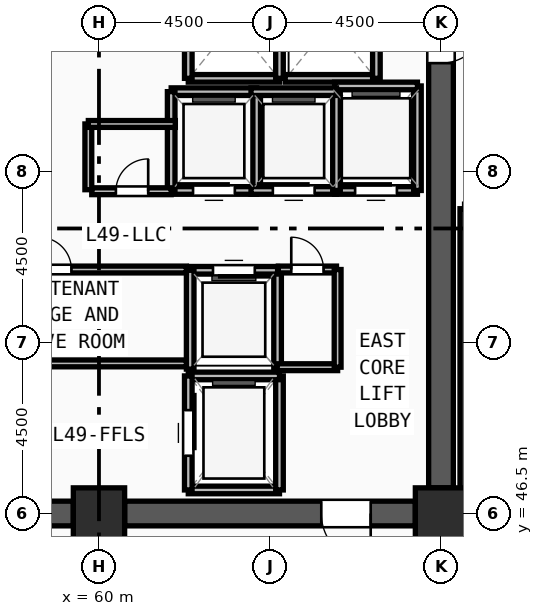
"""IFC4 building model, lengths in metres.
Left out: names, types, materials, properties, quantities, classifications, styles, units other than length and angle.
Written with IfcOpenShell. Run it as: python <this file> out.ifc"""

import sys

from ifc_helpers import new_model, si_unit, direction, frame, frame_2d, origin, origin_2d, place, context, subcontext, project, spatial, rectangle, extrude, source, transform, mapped, element, fill, save


model = new_model("IFC4")
c1 = context("Model", 3, precision=1e-05, world=origin(), true_north=direction((0.0, 1.0)))
c2 = subcontext(c1, "Body", "Model", "MODEL_VIEW")
j1 = project(units=[si_unit("LENGTHUNIT", "METRE"), si_unit("PLANEANGLEUNIT", "RADIAN")], contexts=[c1])
p1 = place(None, origin())
s1 = spatial("IfcSite", under=j1, at=p1, CompositionType="ELEMENT")
p2 = place(p1, origin())
s2 = spatial("IfcBuilding", under=s1, at=p2, CompositionType="ELEMENT")
p3 = place(p2, frame((0.0, 0.0, 189.75)))
s3 = spatial("IfcBuildingStorey", under=s2, at=p3, CompositionType="ELEMENT", Elevation=189.75)
m1 = source(origin(), c2, "Body", "SweptSolid", [
    extrude(rectangle(XDim=1.35, YDim=1.35, at=origin_2d()), origin(), (0.0, 0.0, 1.0), 4.5),
])
for number, where, z_axis, x_axis in (
    (1, (60.0, 46.5, 0.0), (0.0, 0.0, 1.0), (1.0, 0.0, 0.0)),
    (2, (69.0, 46.5, 0.0), (0.0, 0.0, 1.0), (1.0, 0.0, 0.0)),
):
    element("IfcColumn", number, at=place(p3, frame(where, z_axis=z_axis, x_axis=x_axis)), inside=s3, PredefinedType="COLUMN", context=c2, shape_type="MappedRepresentation", body=[
        mapped(m1, transform((0.0, 0.0, 0.0), x_axis=(1.0, 0.0, 0.0), y_axis=(0.0, 1.0, 0.0), z_axis=(0.0, 0.0, 1.0), scale=1.0)),
    ])
p4 = place(p3, frame((69.0, 60.825, 0.0), z_axis=(0.0, 0.0, 1.0), x_axis=(0.0, -1.0, 0.0)))
e3 = element("IfcWall", 3, at=p4, inside=s3, PredefinedType="SHEAR", context=c2, shape_type="SweptSolid", body=[
    extrude(rectangle(XDim=13.65, YDim=0.65, at=frame_2d((6.825, 0.0))), origin(), (0.0, 0.0, 1.0), 4.32),
])
m2 = source(origin(), c2, "Body", "SweptSolid", [
    extrude(rectangle(XDim=1.2, YDim=2.2, at=frame_2d((0.6, 1.1))), frame((0.0, 0.335, 0.0), z_axis=(0.0, -1.0, 0.0), x_axis=(1.0, 0.0, 0.0)), (0.0, 0.0, 1.0), 0.67),
])
p5 = place(p4, frame((1.275, 0.0, 0.0)))
e4 = element("IfcOpeningElement", 4, at=p5, cuts=e3, PredefinedType="OPENING", context=c2, shape_type="MappedRepresentation", body=[
    mapped(m2, transform((0.0, 0.0, 0.0), x_axis=(1.0, 0.0, 0.0), y_axis=(0.0, 1.0, 0.0), z_axis=(0.0, 0.0, 1.0), scale=1.0)),
])
p6 = place(p3, frame((68.325, 46.5, 0.0), z_axis=(0.0, 0.0, 1.0), x_axis=(-1.0, 0.0, 0.0)))
e5 = element("IfcWall", 5, at=p6, inside=s3, PredefinedType="SHEAR", context=c2, shape_type="SweptSolid", body=[
    extrude(rectangle(XDim=7.65, YDim=0.65, at=frame_2d((3.825, 0.0))), origin(), (0.0, 0.0, 1.0), 4.32),
])
m3 = source(origin(), c2, "Body", "SweptSolid", [
    extrude(rectangle(XDim=1.3, YDim=2.2, at=frame_2d((0.65, 1.1))), frame((0.0, 0.335, 0.0), z_axis=(0.0, -1.0, 0.0), x_axis=(1.0, 0.0, 0.0)), (0.0, 0.0, 1.0), 0.67),
])
p7 = place(p6, frame((1.175, 0.0, 0.0)))
e6 = element("IfcOpeningElement", 6, at=p7, cuts=e5, PredefinedType="OPENING", context=c2, shape_type="MappedRepresentation", body=[
    mapped(m3, transform((0.0, 0.0, 0.0), x_axis=(1.0, 0.0, 0.0), y_axis=(0.0, 1.0, 0.0), z_axis=(0.0, 0.0, 1.0), scale=1.0)),
])
p8 = place(p3, frame((59.325, 46.5, 0.0), z_axis=(0.0, 0.0, 1.0), x_axis=(-1.0, 0.0, 0.0)))
e7 = element("IfcWall", 7, at=p8, inside=s3, PredefinedType="SHEAR", context=c2, shape_type="SweptSolid", body=[
    extrude(rectangle(XDim=7.65, YDim=0.65, at=frame_2d((3.825, 0.0))), origin(), (0.0, 0.0, 1.0), 4.32),
])
p9 = place(p8, frame((5.175, 0.0, 0.0)))
e8 = element("IfcOpeningElement", 8, at=p9, cuts=e7, PredefinedType="OPENING", context=c2, shape_type="MappedRepresentation", body=[
    mapped(m3, transform((0.0, 0.0, 0.0), x_axis=(1.0, 0.0, 0.0), y_axis=(0.0, 1.0, 0.0), z_axis=(0.0, 0.0, 1.0), scale=1.0)),
])
m4 = source(origin(), c2, "Body", "SweptSolid", [
    extrude(rectangle(XDim=1.0, YDim=2.2, at=frame_2d((0.5, 1.1))), frame((0.0, 0.335, 0.0), z_axis=(0.0, -1.0, 0.0), x_axis=(1.0, 0.0, 0.0)), (0.0, 0.0, 1.0), 0.67),
])
p10 = place(p8, frame((0.675, 0.0, 0.0)))
e9 = element("IfcOpeningElement", 9, at=p10, cuts=e7, PredefinedType="OPENING", context=c2, shape_type="MappedRepresentation", body=[
    mapped(m4, transform((0.0, 0.0, 0.0), x_axis=(1.0, 0.0, 0.0), y_axis=(0.0, 1.0, 0.0), z_axis=(0.0, 0.0, 1.0), scale=1.0)),
])
p11 = place(p3, frame((69.62, 54.52, 0.0), z_axis=(0.0, 0.0, 1.0), x_axis=(0.0, -1.0, 0.0)))
e10 = element("IfcWall", 10, at=p11, inside=s3, PredefinedType="SOLIDWALL", context=c2, shape_type="SweptSolid", body=[
    extrude(rectangle(XDim=7.82, YDim=0.24, at=frame_2d((3.91, 0.0))), origin(), (0.0, 0.0, 1.0), 4.32),
])
p12 = place(p3, frame((62.35, 47.12, 0.0), z_axis=(0.0, 0.0, 1.0), x_axis=(1.0, 0.0, 0.0)))
e11 = element("IfcWall", 11, at=p12, inside=s3, PredefinedType="SOLIDWALL", context=c2, shape_type="SweptSolid", body=[
    extrude(rectangle(XDim=2.4, YDim=0.2, at=frame_2d((1.2, 0.0))), origin(), (0.0, 0.0, 1.0), 4.32),
])
p13 = place(p3, frame((64.75, 47.12, 0.0), z_axis=(0.0, 0.0, 1.0), x_axis=(0.0, 1.0, 0.0)))
e12 = element("IfcWall", 12, at=p13, inside=s3, PredefinedType="SOLIDWALL", context=c2, shape_type="SweptSolid", body=[
    extrude(rectangle(XDim=3.0, YDim=0.2, at=frame_2d((1.5, 0.0))), origin(), (0.0, 0.0, 1.0), 4.32),
])
p14 = place(p3, frame((64.75, 50.12, 0.0), z_axis=(0.0, 0.0, 1.0), x_axis=(-1.0, 0.0, 0.0)))
e13 = element("IfcWall", 13, at=p14, inside=s3, PredefinedType="SOLIDWALL", context=c2, shape_type="SweptSolid", body=[
    extrude(rectangle(XDim=2.4, YDim=0.2, at=frame_2d((1.2, 0.0))), origin(), (0.0, 0.0, 1.0), 4.32),
])
p15 = place(p3, frame((62.35, 50.12, 0.0), z_axis=(0.0, 0.0, 1.0), x_axis=(0.0, -1.0, 0.0)))
e14 = element("IfcWall", 14, at=p15, inside=s3, PredefinedType="SOLIDWALL", context=c2, shape_type="SweptSolid", body=[
    extrude(rectangle(XDim=3.0, YDim=0.2, at=frame_2d((1.5, 0.0))), origin(), (0.0, 0.0, 1.0), 4.32),
])
m5 = source(origin(), c2, "Body", "SweptSolid", [
    extrude(rectangle(XDim=1.2, YDim=2.3, at=frame_2d((0.6, 1.15))), frame((0.0, 0.11, 0.0), z_axis=(0.0, -1.0, 0.0), x_axis=(1.0, 0.0, 0.0)), (0.0, 0.0, 1.0), 0.22),
])
p16 = place(p15, frame((0.9, 0.0, 0.0)))
e15 = element("IfcOpeningElement", 15, at=p16, cuts=e14, PredefinedType="OPENING", context=c2, shape_type="MappedRepresentation", body=[
    mapped(m5, transform((0.0, 0.0, 0.0), x_axis=(1.0, 0.0, 0.0), y_axis=(0.0, 1.0, 0.0), z_axis=(0.0, 0.0, 1.0), scale=1.0)),
])
p17 = place(p3, frame((62.35, 57.95, 0.0), z_axis=(0.0, 0.0, 1.0), x_axis=(1.0, 0.0, 0.0)))
e16 = element("IfcWall", 16, at=p17, inside=s3, PredefinedType="SOLIDWALL", context=c2, shape_type="SweptSolid", body=[
    extrude(rectangle(XDim=2.4, YDim=0.2, at=frame_2d((1.2, 0.0))), origin(), (0.0, 0.0, 1.0), 4.32),
])
for number, where, z_axis, x_axis in (
    (17, (64.75, 57.95, 0.0), (0.0, 0.0, 1.0), (0.0, 1.0, 0.0)),
    (18, (62.35, 60.88, 0.0), (0.0, 0.0, 1.0), (0.0, -1.0, 0.0)),
):
    element("IfcWall", number, at=place(p3, frame(where, z_axis=z_axis, x_axis=x_axis)), inside=s3, PredefinedType="SOLIDWALL", context=c2, shape_type="SweptSolid", body=[
        extrude(rectangle(XDim=2.93, YDim=0.2, at=frame_2d((1.465, 0.0))), origin(), (0.0, 0.0, 1.0), 4.32),
    ])
p18 = place(p3, frame((64.9, 57.95, 0.0), z_axis=(0.0, 0.0, 1.0), x_axis=(1.0, 0.0, 0.0)))
e19 = element("IfcWall", 19, at=p18, inside=s3, PredefinedType="SOLIDWALL", context=c2, shape_type="SweptSolid", body=[
    extrude(rectangle(XDim=2.4, YDim=0.2, at=frame_2d((1.2, 0.0))), origin(), (0.0, 0.0, 1.0), 4.32),
])
p19 = place(p3, frame((67.3, 57.95, 0.0), z_axis=(0.0, 0.0, 1.0), x_axis=(0.0, 1.0, 0.0)))
e20 = element("IfcWall", 20, at=p19, inside=s3, PredefinedType="SOLIDWALL", context=c2, shape_type="SweptSolid", body=[
    extrude(rectangle(XDim=2.93, YDim=0.2, at=frame_2d((1.465, 0.0))), origin(), (0.0, 0.0, 1.0), 4.32),
])
p20 = place(p3, frame((66.2, 55.0, 0.0), z_axis=(0.0, 0.0, 1.0), x_axis=(1.0, 0.0, 0.0)))
e21 = element("IfcWall", 21, at=p20, inside=s3, PredefinedType="SOLIDWALL", context=c2, shape_type="SweptSolid", body=[
    extrude(rectangle(XDim=2.18, YDim=0.2, at=frame_2d((1.09, 0.0))), origin(), (0.0, 0.0, 1.0), 4.32),
])
m6 = source(origin(), c2, "Body", "SweptSolid", [
    extrude(rectangle(XDim=1.1, YDim=2.2, at=frame_2d((0.55, 1.1))), frame((0.0, 0.11, 0.0), z_axis=(0.0, -1.0, 0.0), x_axis=(1.0, 0.0, 0.0)), (0.0, 0.0, 1.0), 0.22),
])
p21 = place(p20, frame((0.54, 0.0, 0.0)))
e22 = element("IfcOpeningElement", 22, at=p21, cuts=e21, PredefinedType="OPENING", context=c2, shape_type="MappedRepresentation", body=[
    mapped(m6, transform((0.0, 0.0, 0.0), x_axis=(1.0, 0.0, 0.0), y_axis=(0.0, 1.0, 0.0), z_axis=(0.0, 0.0, 1.0), scale=1.0)),
])
p22 = place(p3, frame((68.38, 55.0, 0.0), z_axis=(0.0, 0.0, 1.0), x_axis=(0.0, 1.0, 0.0)))
e23 = element("IfcWall", 23, at=p22, inside=s3, PredefinedType="SOLIDWALL", context=c2, shape_type="SweptSolid", body=[
    extrude(rectangle(XDim=2.75, YDim=0.2, at=frame_2d((1.375, 0.0))), origin(), (0.0, 0.0, 1.0), 4.32),
])
p23 = place(p3, frame((68.38, 57.75, 0.0), z_axis=(0.0, 0.0, 1.0), x_axis=(-1.0, 0.0, 0.0)))
e24 = element("IfcWall", 24, at=p23, inside=s3, PredefinedType="SOLIDWALL", context=c2, shape_type="SweptSolid", body=[
    extrude(rectangle(XDim=2.18, YDim=0.2, at=frame_2d((1.09, 0.0))), origin(), (0.0, 0.0, 1.0), 4.32),
])
p24 = place(p3, frame((64.7, 50.3, 0.0), z_axis=(0.0, 0.0, 1.0), x_axis=(0.0, 1.0, 0.0)))
e25 = element("IfcWall", 25, at=p24, inside=s3, PredefinedType="SOLIDWALL", context=c2, shape_type="SweptSolid", body=[
    extrude(rectangle(XDim=2.6, YDim=0.2, at=frame_2d((1.3, 0.0))), origin(), (0.0, 0.0, 1.0), 4.32),
])
p25 = place(p3, frame((64.7, 52.9, 0.0), z_axis=(0.0, 0.0, 1.0), x_axis=(-1.0, 0.0, 0.0)))
e26 = element("IfcWall", 26, at=p25, inside=s3, PredefinedType="SOLIDWALL", context=c2, shape_type="SweptSolid", body=[
    extrude(rectangle(XDim=2.3, YDim=0.2, at=frame_2d((1.15, 0.0))), origin(), (0.0, 0.0, 1.0), 4.32),
])
p26 = place(p25, frame((0.6, 0.0, 0.0)))
e27 = element("IfcOpeningElement", 27, at=p26, cuts=e26, PredefinedType="OPENING", context=c2, shape_type="MappedRepresentation", body=[
    mapped(m6, transform((0.0, 0.0, 0.0), x_axis=(1.0, 0.0, 0.0), y_axis=(0.0, 1.0, 0.0), z_axis=(0.0, 0.0, 1.0), scale=1.0)),
])
p27 = place(p3, frame((62.4, 52.9, 0.0), z_axis=(0.0, 0.0, 1.0), x_axis=(0.0, -1.0, 0.0)))
e28 = element("IfcWall", 28, at=p27, inside=s3, PredefinedType="SOLIDWALL", context=c2, shape_type="SweptSolid", body=[
    extrude(rectangle(XDim=2.6, YDim=0.2, at=frame_2d((1.3, 0.0))), origin(), (0.0, 0.0, 1.0), 4.32),
])
p28 = place(p3, frame((61.9, 55.0, 0.0), z_axis=(0.0, 0.0, 1.0), x_axis=(1.0, 0.0, 0.0)))
e29 = element("IfcWall", 29, at=p28, inside=s3, PredefinedType="SOLIDWALL", context=c2, shape_type="SweptSolid", body=[
    extrude(rectangle(XDim=2.25, YDim=0.2, at=frame_2d((1.125, 0.0))), origin(), (0.0, 0.0, 1.0), 4.32),
])
p29 = place(p28, frame((0.575, 0.0, 0.0)))
e30 = element("IfcOpeningElement", 30, at=p29, cuts=e29, PredefinedType="OPENING", context=c2, shape_type="MappedRepresentation", body=[
    mapped(m6, transform((0.0, 0.0, 0.0), x_axis=(1.0, 0.0, 0.0), y_axis=(0.0, 1.0, 0.0), z_axis=(0.0, 0.0, 1.0), scale=1.0)),
])
p30 = place(p3, frame((64.15, 55.0, 0.0), z_axis=(0.0, 0.0, 1.0), x_axis=(0.0, 1.0, 0.0)))
e31 = element("IfcWall", 31, at=p30, inside=s3, PredefinedType="SOLIDWALL", context=c2, shape_type="SweptSolid", body=[
    extrude(rectangle(XDim=2.6, YDim=0.2, at=frame_2d((1.3, 0.0))), origin(), (0.0, 0.0, 1.0), 4.32),
])
p31 = place(p3, frame((64.15, 57.6, 0.0), z_axis=(0.0, 0.0, 1.0), x_axis=(-1.0, 0.0, 0.0)))
e32 = element("IfcWall", 32, at=p31, inside=s3, PredefinedType="SOLIDWALL", context=c2, shape_type="SweptSolid", body=[
    extrude(rectangle(XDim=2.25, YDim=0.2, at=frame_2d((1.125, 0.0))), origin(), (0.0, 0.0, 1.0), 4.32),
])
p32 = place(p3, frame((61.9, 57.6, 0.0), z_axis=(0.0, 0.0, 1.0), x_axis=(0.0, -1.0, 0.0)))
e33 = element("IfcWall", 33, at=p32, inside=s3, PredefinedType="SOLIDWALL", context=c2, shape_type="SweptSolid", body=[
    extrude(rectangle(XDim=2.6, YDim=0.2, at=frame_2d((1.3, 0.0))), origin(), (0.0, 0.0, 1.0), 4.32),
])
p33 = place(p3, frame((64.0, 55.0, 0.0), z_axis=(0.0, 0.0, 1.0), x_axis=(1.0, 0.0, 0.0)))
e34 = element("IfcWall", 34, at=p33, inside=s3, PredefinedType="SOLIDWALL", context=c2, shape_type="SweptSolid", body=[
    extrude(rectangle(XDim=2.25, YDim=0.2, at=frame_2d((1.125, 0.0))), origin(), (0.0, 0.0, 1.0), 4.32),
])
p34 = place(p33, frame((0.575, 0.0, 0.0)))
e35 = element("IfcOpeningElement", 35, at=p34, cuts=e34, PredefinedType="OPENING", context=c2, shape_type="MappedRepresentation", body=[
    mapped(m6, transform((0.0, 0.0, 0.0), x_axis=(1.0, 0.0, 0.0), y_axis=(0.0, 1.0, 0.0), z_axis=(0.0, 0.0, 1.0), scale=1.0)),
])
p35 = place(p3, frame((66.25, 55.0, 0.0), z_axis=(0.0, 0.0, 1.0), x_axis=(0.0, 1.0, 0.0)))
e36 = element("IfcWall", 36, at=p35, inside=s3, PredefinedType="SOLIDWALL", context=c2, shape_type="SweptSolid", body=[
    extrude(rectangle(XDim=2.6, YDim=0.2, at=frame_2d((1.3, 0.0))), origin(), (0.0, 0.0, 1.0), 4.32),
])
p36 = place(p3, frame((66.25, 57.6, 0.0), z_axis=(0.0, 0.0, 1.0), x_axis=(-1.0, 0.0, 0.0)))
e37 = element("IfcWall", 37, at=p36, inside=s3, PredefinedType="SOLIDWALL", context=c2, shape_type="SweptSolid", body=[
    extrude(rectangle(XDim=2.25, YDim=0.2, at=frame_2d((1.125, 0.0))), origin(), (0.0, 0.0, 1.0), 4.32),
])
p37 = place(p3, frame((55.39, 52.92, 0.0), z_axis=(0.0, 0.0, 1.0), x_axis=(1.0, 0.0, 0.0)))
e38 = element("IfcWall", 38, at=p37, inside=s3, PredefinedType="PARTITIONING", context=c2, shape_type="SweptSolid", body=[
    extrude(rectangle(XDim=6.91, YDim=0.18, at=frame_2d((3.455, 0.0))), origin(), (0.0, 0.0, 1.0), 4.32),
])
m7 = source(origin(), c2, "Body", "SweptSolid", [
    extrude(rectangle(XDim=0.85, YDim=2.1, at=frame_2d((0.425, 1.05))), frame((0.0, 0.1, 0.0), z_axis=(0.0, -1.0, 0.0), x_axis=(1.0, 0.0, 0.0)), (0.0, 0.0, 1.0), 0.2),
])
p38 = place(p37, frame((3.035, 0.0, 0.0)))
e39 = element("IfcOpeningElement", 39, at=p38, cuts=e38, PredefinedType="OPENING", context=c2, shape_type="MappedRepresentation", body=[
    mapped(m7, transform((0.0, 0.0, 0.0), x_axis=(1.0, 0.0, 0.0), y_axis=(0.0, 1.0, 0.0), z_axis=(0.0, 0.0, 1.0), scale=1.0)),
])
p39 = place(p3, frame((59.81, 54.98, 0.0), z_axis=(0.0, 0.0, 1.0), x_axis=(1.0, 0.0, 0.0)))
e40 = element("IfcWall", 40, at=p39, inside=s3, PredefinedType="PARTITIONING", context=c2, shape_type="SweptSolid", body=[
    extrude(rectangle(XDim=2.09, YDim=0.18, at=frame_2d((1.045, 0.0))), origin(), (0.0, 0.0, 1.0), 4.32),
])
p40 = place(p39, frame((0.635, 0.0, 0.0)))
e41 = element("IfcOpeningElement", 41, at=p40, cuts=e40, PredefinedType="OPENING", context=c2, shape_type="MappedRepresentation", body=[
    mapped(m7, transform((0.0, 0.0, 0.0), x_axis=(1.0, 0.0, 0.0), y_axis=(0.0, 1.0, 0.0), z_axis=(0.0, 0.0, 1.0), scale=1.0)),
])
p41 = place(p3, frame((64.72, 52.92, 0.0), z_axis=(0.0, 0.0, 1.0), x_axis=(1.0, 0.0, 0.0)))
e42 = element("IfcWall", 42, at=p41, inside=s3, PredefinedType="PARTITIONING", context=c2, shape_type="SweptSolid", body=[
    extrude(rectangle(XDim=1.53, YDim=0.18, at=frame_2d((0.765, 0.0))), origin(), (0.0, 0.0, 1.0), 4.32),
])
p42 = place(p41, frame((0.34, 0.0, 0.0)))
e43 = element("IfcOpeningElement", 43, at=p42, cuts=e42, PredefinedType="OPENING", context=c2, shape_type="MappedRepresentation", body=[
    mapped(m7, transform((0.0, 0.0, 0.0), x_axis=(1.0, 0.0, 0.0), y_axis=(0.0, 1.0, 0.0), z_axis=(0.0, 0.0, 1.0), scale=1.0)),
])
p43 = place(p3, frame((59.72, 55.02, 0.0), z_axis=(0.0, 0.0, 1.0), x_axis=(0.0, 1.0, 0.0)))
e44 = element("IfcWall", 44, at=p43, inside=s3, PredefinedType="PARTITIONING", context=c2, shape_type="SweptSolid", body=[
    extrude(rectangle(XDim=1.73, YDim=0.18, at=frame_2d((0.865, 0.0))), origin(), (0.0, 0.0, 1.0), 4.32),
])
p44 = place(p3, frame((59.72, 56.75, 0.0), z_axis=(0.0, 0.0, 1.0), x_axis=(1.0, 0.0, 0.0)))
e45 = element("IfcWall", 45, at=p44, inside=s3, PredefinedType="PARTITIONING", context=c2, shape_type="SweptSolid", body=[
    extrude(rectangle(XDim=2.29, YDim=0.18, at=frame_2d((1.145, 0.0))), origin(), (0.0, 0.0, 1.0), 4.32),
])
p45 = place(p3, frame((64.69, 50.35, 0.0), z_axis=(0.0, 0.0, 1.0), x_axis=(1.0, 0.0, 0.0)))
e46 = element("IfcWall", 46, at=p45, inside=s3, PredefinedType="PARTITIONING", context=c2, shape_type="SweptSolid", body=[
    extrude(rectangle(XDim=1.59, YDim=0.18, at=frame_2d((0.795, 0.0))), origin(), (0.0, 0.0, 1.0), 4.32),
])
p46 = place(p3, frame((66.28, 50.35, 0.0), z_axis=(0.0, 0.0, 1.0), x_axis=(0.0, 1.0, 0.0)))
e47 = element("IfcWall", 47, at=p46, inside=s3, PredefinedType="PARTITIONING", context=c2, shape_type="SweptSolid", body=[
    extrude(rectangle(XDim=2.57, YDim=0.18, at=frame_2d((1.285, 0.0))), origin(), (0.0, 0.0, 1.0), 4.32),
])
p47 = place(p3, frame((55.39, 50.45, 0.0), z_axis=(0.0, 0.0, 1.0), x_axis=(1.0, 0.0, 0.0)))
e48 = element("IfcWall", 48, at=p47, inside=s3, PredefinedType="PARTITIONING", context=c2, shape_type="SweptSolid", body=[
    extrude(rectangle(XDim=6.91, YDim=0.18, at=frame_2d((3.455, 0.0))), origin(), (0.0, 0.0, 1.0), 4.32),
])
m8 = source(origin(), c2, "Body", "SweptSolid", [
    extrude(rectangle(XDim=1.3, YDim=2.2, at=frame_2d((0.65, 1.1))), frame((0.0, 0.025, 0.0), z_axis=(0.0, -1.0, 0.0), x_axis=(1.0, 0.0, 0.0)), (0.0, 0.0, 1.0), 0.05),
])
p48 = place(p7, origin())
e49 = element("IfcDoor", 49, at=p48, inside=s3, OperationType="SINGLE_SWING_LEFT", PredefinedType="DOOR", context=c2, shape_type="MappedRepresentation", body=[
    mapped(m8, transform((0.0, 0.0, 0.0), x_axis=(1.0, 0.0, 0.0), y_axis=(0.0, 1.0, 0.0), z_axis=(0.0, 0.0, 1.0), scale=1.0)),
])
fill(e6, e49)
m9 = source(origin(), c2, "Body", "SweptSolid", [
    extrude(rectangle(XDim=1.2, YDim=2.2, at=frame_2d((0.6, 1.1))), frame((0.0, 0.025, 0.0), z_axis=(0.0, -1.0, 0.0), x_axis=(1.0, 0.0, 0.0)), (0.0, 0.0, 1.0), 0.05),
])
p49 = place(p5, origin())
e50 = element("IfcDoor", 50, at=p49, inside=s3, OperationType="SINGLE_SWING_LEFT", PredefinedType="DOOR", context=c2, shape_type="MappedRepresentation", body=[
    mapped(m9, transform((0.0, 0.0, 0.0), x_axis=(1.0, 0.0, 0.0), y_axis=(0.0, 1.0, 0.0), z_axis=(0.0, 0.0, 1.0), scale=1.0)),
])
fill(e4, e50)
m10 = source(origin(), c2, "Body", "SweptSolid", [
    extrude(rectangle(XDim=1.2, YDim=2.3, at=frame_2d((0.6, 1.15))), frame((0.0, 0.025, 0.0), z_axis=(0.0, -1.0, 0.0), x_axis=(1.0, 0.0, 0.0)), (0.0, 0.0, 1.0), 0.05),
])
p50 = place(p16, origin())
e51 = element("IfcDoor", 51, at=p50, inside=s3, OperationType="SLIDING_TO_LEFT", PredefinedType="DOOR", context=c2, shape_type="MappedRepresentation", body=[
    mapped(m10, transform((0.0, 0.0, 0.0), x_axis=(1.0, 0.0, 0.0), y_axis=(0.0, 1.0, 0.0), z_axis=(0.0, 0.0, 1.0), scale=1.0)),
])
fill(e15, e51)
m11 = source(origin(), c2, "Body", "SweptSolid", [
    extrude(rectangle(XDim=1.1, YDim=2.2, at=frame_2d((0.55, 1.1))), frame((0.0, 0.025, 0.0), z_axis=(0.0, -1.0, 0.0), x_axis=(1.0, 0.0, 0.0)), (0.0, 0.0, 1.0), 0.05),
])
p51 = place(p21, origin())
e52 = element("IfcDoor", 52, at=p51, inside=s3, OperationType="SLIDING_TO_LEFT", PredefinedType="DOOR", context=c2, shape_type="MappedRepresentation", body=[
    mapped(m11, transform((0.0, 0.0, 0.0), x_axis=(1.0, 0.0, 0.0), y_axis=(0.0, 1.0, 0.0), z_axis=(0.0, 0.0, 1.0), scale=1.0)),
])
fill(e22, e52)
p52 = place(p26, origin())
e53 = element("IfcDoor", 53, at=p52, inside=s3, OperationType="SLIDING_TO_LEFT", PredefinedType="DOOR", context=c2, shape_type="MappedRepresentation", body=[
    mapped(m11, transform((0.0, 0.0, 0.0), x_axis=(1.0, 0.0, 0.0), y_axis=(0.0, 1.0, 0.0), z_axis=(0.0, 0.0, 1.0), scale=1.0)),
])
fill(e27, e53)
p53 = place(p29, origin())
e54 = element("IfcDoor", 54, at=p53, inside=s3, OperationType="SLIDING_TO_LEFT", PredefinedType="DOOR", context=c2, shape_type="MappedRepresentation", body=[
    mapped(m11, transform((0.0, 0.0, 0.0), x_axis=(1.0, 0.0, 0.0), y_axis=(0.0, 1.0, 0.0), z_axis=(0.0, 0.0, 1.0), scale=1.0)),
])
fill(e30, e54)
p54 = place(p34, origin())
e55 = element("IfcDoor", 55, at=p54, inside=s3, OperationType="SLIDING_TO_LEFT", PredefinedType="DOOR", context=c2, shape_type="MappedRepresentation", body=[
    mapped(m11, transform((0.0, 0.0, 0.0), x_axis=(1.0, 0.0, 0.0), y_axis=(0.0, 1.0, 0.0), z_axis=(0.0, 0.0, 1.0), scale=1.0)),
])
fill(e35, e55)
m12 = source(origin(), c2, "Body", "SweptSolid", [
    extrude(rectangle(XDim=0.85, YDim=2.1, at=frame_2d((0.425, 1.05))), frame((0.0, 0.025, 0.0), z_axis=(0.0, -1.0, 0.0), x_axis=(1.0, 0.0, 0.0)), (0.0, 0.0, 1.0), 0.05),
])
p55 = place(p38, origin())
e56 = element("IfcDoor", 56, at=p55, inside=s3, OperationType="SINGLE_SWING_LEFT", PredefinedType="DOOR", context=c2, shape_type="MappedRepresentation", body=[
    mapped(m12, transform((0.0, 0.0, 0.0), x_axis=(1.0, 0.0, 0.0), y_axis=(0.0, 1.0, 0.0), z_axis=(0.0, 0.0, 1.0), scale=1.0)),
])
fill(e39, e56)
p56 = place(p40, origin())
e57 = element("IfcDoor", 57, at=p56, inside=s3, OperationType="SINGLE_SWING_RIGHT", PredefinedType="DOOR", context=c2, shape_type="MappedRepresentation", body=[
    mapped(m12, transform((0.0, 0.0, 0.0), x_axis=(1.0, 0.0, 0.0), y_axis=(0.0, 1.0, 0.0), z_axis=(0.0, 0.0, 1.0), scale=1.0)),
])
fill(e41, e57)
p57 = place(p42, origin())
e58 = element("IfcDoor", 58, at=p57, inside=s3, OperationType="SINGLE_SWING_LEFT", PredefinedType="DOOR", context=c2, shape_type="MappedRepresentation", body=[
    mapped(m12, transform((0.0, 0.0, 0.0), x_axis=(1.0, 0.0, 0.0), y_axis=(0.0, 1.0, 0.0), z_axis=(0.0, 0.0, 1.0), scale=1.0)),
])
fill(e43, e58)
save(model, sys.argv[1])
